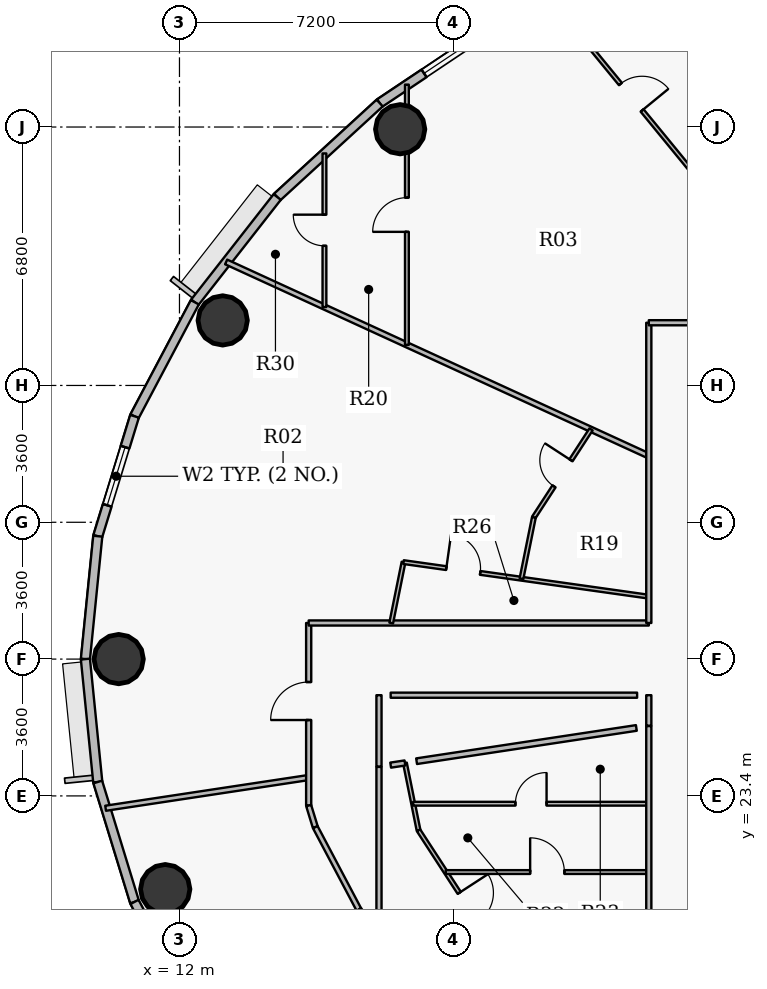
"""IFC4 building model, lengths in metres.
Left out: names, types, materials, properties, quantities, classifications, styles, units other than length and angle.
Written with IfcOpenShell. Run it as: python <this file> out.ifc"""

import sys

from ifc_helpers import new_model, si_unit, direction, frame, frame_2d, origin, origin_2d, place, context, subcontext, project, spatial, rectangle, hollow_circle, extrude, source, transform, mapped, element, fill, save


model = new_model("IFC4")
c1 = context("Model", 3, precision=1e-05, world=origin(), true_north=direction((0.0, 1.0)))
c2 = subcontext(c1, "Body", "Model", "MODEL_VIEW")
j1 = project(units=[si_unit("LENGTHUNIT", "METRE"), si_unit("PLANEANGLEUNIT", "RADIAN")], contexts=[c1])
p1 = place(None, origin())
s1 = spatial("IfcSite", under=j1, at=p1, CompositionType="ELEMENT")
p2 = place(p1, origin())
s2 = spatial("IfcBuilding", under=s1, at=p2, CompositionType="ELEMENT")
p3 = place(p2, frame((0.0, 0.0, 159.9)))
s3 = spatial("IfcBuildingStorey", under=s2, at=p3, CompositionType="ELEMENT", Elevation=159.9)
for number, where, z_axis, x_axis in (
    (1, (17.808, 40.942, 0.0), (0.0, 0.0, 1.0), (1.0, 0.0, 0.0)),
    (2, (13.137, 35.911, 0.0), (0.0, 0.0, 1.0), (1.0, 0.0, 0.0)),
    (3, (10.4, 27.0, 0.0), (0.0, 0.0, 1.0), (1.0, 0.0, 0.0)),
    (4, (11.625, 20.947, 0.0), (0.0, 0.0, 1.0), (1.0, 0.0, 0.0)),
):
    element("IfcColumn", number, at=place(p3, frame(where, z_axis=z_axis, x_axis=x_axis)), inside=s3, PredefinedType="COLUMN", context=c2, shape_type="SweptSolid", body=[
        extrude(hollow_circle(Radius=0.65, WallThickness=0.04, at=origin_2d()), origin(), (0.0, 0.0, 1.0), 3.75),
    ])
p4 = place(p3, frame((17.268, 41.631, 0.0), z_axis=(0.0, 0.0, 1.0), x_axis=(0.831228998277, 0.555930168657, 0.0)))
e5 = element("IfcWall", 5, at=p4, inside=s3, PredefinedType="SOLIDWALL", context=c2, shape_type="SweptSolid", body=[
    extrude(rectangle(XDim=3.8, YDim=0.24, at=frame_2d((1.9, 0.0))), origin(), (0.0, 0.0, 1.0), 3.5),
])
p5 = place(p4, frame((1.405, 0.0, 0.9)))
e6 = element("IfcOpeningElement", 6, at=p5, cuts=e5, PredefinedType="OPENING", context=c2, shape_type="SweptSolid", body=[
    extrude(rectangle(XDim=1.25, YDim=1.65, at=origin_2d()), frame((0.625, 0.13, 0.825), z_axis=(0.0, -1.0, 0.0), x_axis=(1.0, 0.0, 0.0)), (0.0, 0.0, 1.0), 0.26),
])
p6 = place(p3, frame((14.572, 39.158, 0.0), z_axis=(0.0, 0.0, 1.0), x_axis=(0.737076565834, 0.675809245349, 0.0)))
e7 = element("IfcWall", 7, at=p6, inside=s3, PredefinedType="SOLIDWALL", context=c2, shape_type="SweptSolid", body=[
    extrude(rectangle(XDim=3.658, YDim=0.24, at=frame_2d((1.829, 0.0))), origin(), (0.0, 0.0, 1.0), 3.5),
])
p7 = place(p3, frame((12.404, 36.388, 0.0), z_axis=(0.0, 0.0, 1.0), x_axis=(0.616287674549, 0.787521112224, 0.0)))
e8 = element("IfcWall", 8, at=p7, inside=s3, PredefinedType="SOLIDWALL", context=c2, shape_type="SweptSolid", body=[
    extrude(rectangle(XDim=3.517, YDim=0.24, at=frame_2d((1.759, 0.0))), origin(), (0.0, 0.0, 1.0), 3.5),
])
p8 = place(p3, frame((10.817, 33.389, 0.0), z_axis=(0.0, 0.0, 1.0), x_axis=(0.467586874938, 0.88394712194, 0.0)))
e9 = element("IfcWall", 9, at=p8, inside=s3, PredefinedType="SOLIDWALL", context=c2, shape_type="SweptSolid", body=[
    extrude(rectangle(XDim=3.393, YDim=0.24, at=frame_2d((1.697, 0.0))), origin(), (0.0, 0.0, 1.0), 3.5),
])
p9 = place(p3, frame((9.85, 30.234, 0.0), z_axis=(0.0, 0.0, 1.0), x_axis=(0.293097995113, 0.956082405058, 0.0)))
e10 = element("IfcWall", 10, at=p9, inside=s3, PredefinedType="SOLIDWALL", context=c2, shape_type="SweptSolid", body=[
    extrude(rectangle(XDim=3.3, YDim=0.24, at=frame_2d((1.65, 0.0))), origin(), (0.0, 0.0, 1.0), 3.5),
])
p10 = place(p9, frame((0.85, 0.0, 0.9)))
e11 = element("IfcOpeningElement", 11, at=p10, cuts=e10, PredefinedType="OPENING", context=c2, shape_type="SweptSolid", body=[
    extrude(rectangle(XDim=1.6, YDim=1.75, at=origin_2d()), frame((0.8, 0.13, 0.875), z_axis=(0.0, -1.0, 0.0), x_axis=(1.0, 0.0, 0.0)), (0.0, 0.0, 1.0), 0.26),
])
for number, where, z_axis, x_axis in (
    (12, (9.525, 27.0, 0.0), (0.0, 0.0, 1.0), (0.1, 0.995, 0.0)),
    (13, (9.85, 23.766, 0.0), (0.0, 0.0, 1.0), (-0.1, 0.995, 0.0)),
):
    element("IfcWall", number, at=place(p3, frame(where, z_axis=z_axis, x_axis=x_axis)), inside=s3, PredefinedType="SOLIDWALL", context=c2, shape_type="SweptSolid", body=[
        extrude(rectangle(XDim=3.25, YDim=0.24, at=frame_2d((1.625, 0.0))), origin(), (0.0, 0.0, 1.0), 3.5),
    ])
p11 = place(p3, frame((10.817, 20.611, 0.0), z_axis=(0.0, 0.0, 1.0), x_axis=(-0.293097995113, 0.956082405058, 0.0)))
e14 = element("IfcWall", 14, at=p11, inside=s3, PredefinedType="SOLIDWALL", context=c2, shape_type="SweptSolid", body=[
    extrude(rectangle(XDim=3.3, YDim=0.24, at=frame_2d((1.65, 0.0))), origin(), (0.0, 0.0, 1.0), 3.5),
])
p12 = place(p3, frame((12.404, 17.612, 0.0), z_axis=(0.0, 0.0, 1.0), x_axis=(-0.467586874938, 0.88394712194, 0.0)))
e15 = element("IfcWall", 15, at=p12, inside=s3, PredefinedType="SOLIDWALL", context=c2, shape_type="SweptSolid", body=[
    extrude(rectangle(XDim=3.393, YDim=0.24, at=frame_2d((1.697, 0.0))), origin(), (0.0, 0.0, 1.0), 3.5),
])
p13 = place(p12, frame((1.072, 0.0, 0.9)))
e16 = element("IfcOpeningElement", 16, at=p13, cuts=e15, PredefinedType="OPENING", context=c2, shape_type="SweptSolid", body=[
    extrude(rectangle(XDim=1.25, YDim=1.65, at=origin_2d()), frame((0.625, 0.13, 0.825), z_axis=(0.0, -1.0, 0.0), x_axis=(1.0, 0.0, 0.0)), (0.0, 0.0, 1.0), 0.26),
])
p14 = place(p3, frame((10.057, 23.075, 0.0), z_axis=(0.0, 0.0, 1.0), x_axis=(0.988756022356, 0.14953771516, 0.0)))
e17 = element("IfcWall", 17, at=p14, inside=s3, PredefinedType="PARTITIONING", context=c2, shape_type="SweptSolid", body=[
    extrude(rectangle(XDim=5.404, YDim=0.135, at=frame_2d((2.702, 0.0))), origin(), (0.0, 0.0, 1.0), 2.935),
])
p15 = place(p3, frame((13.229, 37.45, 0.0), z_axis=(0.0, 0.0, 1.0), x_axis=(0.908867611309, -0.417084721746, 0.0)))
e18 = element("IfcWall", 18, at=p15, inside=s3, PredefinedType="PARTITIONING", context=c2, shape_type="SweptSolid", body=[
    extrude(rectangle(XDim=12.237, YDim=0.135, at=frame_2d((6.118, 0.0))), origin(), (0.0, 0.0, 1.0), 2.935),
])
p16 = place(p3, frame((15.4, 23.146, 0.0), z_axis=(0.0, 0.0, 1.0), x_axis=(0.0, 1.0, 0.0)))
e19 = element("IfcWall", 19, at=p16, inside=s3, PredefinedType="PARTITIONING", context=c2, shape_type="SweptSolid", body=[
    extrude(rectangle(XDim=4.804, YDim=0.135, at=frame_2d((2.402, 0.0))), origin(), (0.0, 0.0, 1.0), 2.935),
])
p17 = place(p16, frame((2.251, 0.0, 0.0)))
e20 = element("IfcOpeningElement", 20, at=p17, cuts=e19, PredefinedType="OPENING", context=c2, shape_type="SweptSolid", body=[
    extrude(rectangle(XDim=1.0, YDim=2.15, at=origin_2d()), frame((0.5, 0.078, 1.075), z_axis=(0.0, -1.0, 0.0), x_axis=(1.0, 0.0, 0.0)), (0.0, 0.0, 1.0), 0.155),
])
p18 = place(p3, frame((15.4, 23.146, 0.0), z_axis=(0.0, 0.0, 1.0), x_axis=(0.293335154151, -0.956009669061, 0.0)))
e21 = element("IfcWall", 21, at=p18, inside=s3, PredefinedType="PARTITIONING", context=c2, shape_type="SweptSolid", body=[
    extrude(rectangle(XDim=0.594, YDim=0.135, at=frame_2d((0.297, 0.0))), origin(), (0.0, 0.0, 1.0), 3.5),
])
p19 = place(p3, frame((15.4, 27.95, 0.0), z_axis=(0.0, 0.0, 1.0), x_axis=(1.0, 0.0, 0.0)))
e22 = element("IfcWall", 22, at=p19, inside=s3, PredefinedType="PARTITIONING", context=c2, shape_type="SweptSolid", body=[
    extrude(rectangle(XDim=8.95, YDim=0.135, at=frame_2d((4.475, 0.0))), origin(), (0.0, 0.0, 1.0), 3.5),
])
p20 = place(p3, frame((15.574, 22.578, 0.0), z_axis=(0.0, 0.0, 1.0), x_axis=(0.46757196543, -0.883955008552, 0.0)))
e23 = element("IfcWall", 23, at=p20, inside=s3, PredefinedType="PARTITIONING", context=c2, shape_type="SweptSolid", body=[
    extrude(rectangle(XDim=2.451, YDim=0.135, at=frame_2d((1.226, 0.0))), origin(), (0.0, 0.0, 1.0), 2.935),
])
p21 = place(p3, frame((15.815, 36.263, 0.0), z_axis=(0.0, 0.0, 1.0), x_axis=(0.0, 1.0, 0.0)))
e24 = element("IfcWall", 24, at=p21, inside=s3, PredefinedType="PARTITIONING", context=c2, shape_type="SweptSolid", body=[
    extrude(rectangle(XDim=4.042, YDim=0.1, at=frame_2d((2.021, 0.0))), origin(), (0.0, 0.0, 1.0), 2.935),
])
p22 = place(p21, frame((1.611, 0.0, 0.0)))
e25 = element("IfcOpeningElement", 25, at=p22, cuts=e24, PredefinedType="OPENING", context=c2, shape_type="SweptSolid", body=[
    extrude(rectangle(XDim=0.82, YDim=2.1, at=origin_2d()), frame((0.41, 0.06, 1.05), z_axis=(0.0, -1.0, 0.0), x_axis=(1.0, 0.0, 0.0)), (0.0, 0.0, 1.0), 0.12),
])
p23 = place(p3, frame((16.72, 20.411, 0.0), z_axis=(0.0, 0.0, 1.0), x_axis=(0.616377221056, -0.787451027914, 0.0)))
e26 = element("IfcWall", 26, at=p23, inside=s3, PredefinedType="PARTITIONING", context=c2, shape_type="SweptSolid", body=[
    extrude(rectangle(XDim=0.859, YDim=0.135, at=frame_2d((0.43, 0.0))), origin(), (0.0, 0.0, 1.0), 3.5),
])
p24 = place(p3, frame((17.25, 19.734, 0.0), z_axis=(0.0, 0.0, 1.0), x_axis=(0.0, 1.0, 0.0)))
e27 = element("IfcWall", 27, at=p24, inside=s3, PredefinedType="PARTITIONING", context=c2, shape_type="SweptSolid", body=[
    extrude(rectangle(XDim=4.429, YDim=0.135, at=frame_2d((2.215, 0.0))), origin(), (0.0, 0.0, 1.0), 2.935),
])
p25 = place(p3, frame((17.572, 27.95, 0.0), z_axis=(0.0, 0.0, 1.0), x_axis=(0.19821259699, 0.98015905158, 0.0)))
e28 = element("IfcWall", 28, at=p25, inside=s3, PredefinedType="PARTITIONING", context=c2, shape_type="SweptSolid", body=[
    extrude(rectangle(XDim=1.635, YDim=0.1, at=frame_2d((0.817, 0.0))), origin(), (0.0, 0.0, 1.0), 3.5),
])
p26 = place(p3, frame((17.896, 29.552, 0.0), z_axis=(0.0, 0.0, 1.0), x_axis=(0.990212218954, -0.139569915938, 0.0)))
e29 = element("IfcWall", 29, at=p26, inside=s3, PredefinedType="PARTITIONING", context=c2, shape_type="SweptSolid", body=[
    extrude(rectangle(XDim=6.518, YDim=0.1, at=frame_2d((3.259, 0.0))), origin(), (0.0, 0.0, 1.0), 3.5),
])
p27 = place(p26, frame((1.137, 0.0, 0.0)))
e30 = element("IfcOpeningElement", 30, at=p27, cuts=e29, PredefinedType="OPENING", context=c2, shape_type="SweptSolid", body=[
    extrude(rectangle(XDim=0.9, YDim=2.1, at=origin_2d()), frame((0.45, 0.06, 1.05), z_axis=(0.0, -1.0, 0.0), x_axis=(1.0, 0.0, 0.0)), (0.0, 0.0, 1.0), 0.12),
])
p28 = place(p3, frame((17.933, 24.267, 0.0), z_axis=(0.0, 0.0, 1.0), x_axis=(0.198166528342, -0.980168366682, 0.0)))
e31 = element("IfcWall", 31, at=p28, inside=s3, PredefinedType="PARTITIONING", context=c2, shape_type="SweptSolid", body=[
    extrude(rectangle(XDim=1.809, YDim=0.1, at=frame_2d((0.904, 0.0))), origin(), (0.0, 0.0, 1.0), 2.935),
])
p29 = place(p3, frame((17.984, 35.267, 0.0), z_axis=(0.0, 0.0, 1.0), x_axis=(0.0, 1.0, 0.0)))
e32 = element("IfcWall", 32, at=p29, inside=s3, PredefinedType="PARTITIONING", context=c2, shape_type="SweptSolid", body=[
    extrude(rectangle(XDim=6.848, YDim=0.1, at=frame_2d((3.424, 0.0))), origin(), (0.0, 0.0, 1.0), 2.935),
])
p30 = place(p29, frame((2.974, 0.0, 0.0)))
e33 = element("IfcOpeningElement", 33, at=p30, cuts=e32, PredefinedType="OPENING", context=c2, shape_type="SweptSolid", body=[
    extrude(rectangle(XDim=0.9, YDim=2.1, at=origin_2d()), frame((0.45, 0.06, 1.05), z_axis=(0.0, -1.0, 0.0), x_axis=(1.0, 0.0, 0.0)), (0.0, 0.0, 1.0), 0.12),
])
p31 = place(p3, frame((18.15, 23.195, 0.0), z_axis=(0.0, 0.0, 1.0), x_axis=(1.0, 0.0, 0.0)))
e34 = element("IfcWall", 34, at=p31, inside=s3, PredefinedType="PARTITIONING", context=c2, shape_type="SweptSolid", body=[
    extrude(rectangle(XDim=6.2, YDim=0.1, at=frame_2d((3.1, 0.0))), origin(), (0.0, 0.0, 1.0), 2.935),
])
p32 = place(p31, frame((2.69, 0.0, 0.0)))
e35 = element("IfcOpeningElement", 35, at=p32, cuts=e34, PredefinedType="OPENING", context=c2, shape_type="SweptSolid", body=[
    extrude(rectangle(XDim=0.82, YDim=2.1, at=origin_2d()), frame((0.41, 0.06, 1.05), z_axis=(0.0, -1.0, 0.0), x_axis=(1.0, 0.0, 0.0)), (0.0, 0.0, 1.0), 0.12),
])
p33 = place(p3, frame((18.291, 22.494, 0.0), z_axis=(0.0, 0.0, 1.0), x_axis=(0.545405921784, -0.838172047066, 0.0)))
e36 = element("IfcWall", 36, at=p33, inside=s3, PredefinedType="PARTITIONING", context=c2, shape_type="SweptSolid", body=[
    extrude(rectangle(XDim=4.849, YDim=0.1, at=frame_2d((2.425, 0.0))), origin(), (0.0, 0.0, 1.0), 2.935),
])
p34 = place(p33, frame((1.962, 0.0, 0.0)))
e37 = element("IfcOpeningElement", 37, at=p34, cuts=e36, PredefinedType="OPENING", context=c2, shape_type="SweptSolid", body=[
    extrude(rectangle(XDim=0.9, YDim=2.1, at=origin_2d()), frame((0.45, 0.06, 1.05), z_axis=(0.0, -1.0, 0.0), x_axis=(1.0, 0.0, 0.0)), (0.0, 0.0, 1.0), 0.12),
])
p35 = place(p3, frame((19.005, 21.397, 0.0), z_axis=(0.0, 0.0, 1.0), x_axis=(1.0, 0.0, 0.0)))
e38 = element("IfcWall", 38, at=p35, inside=s3, PredefinedType="PARTITIONING", context=c2, shape_type="SweptSolid", body=[
    extrude(rectangle(XDim=5.345, YDim=0.1, at=frame_2d((2.672, 0.0))), origin(), (0.0, 0.0, 1.0), 3.5),
])
p36 = place(p35, frame((2.222, 0.0, 0.0)))
e39 = element("IfcOpeningElement", 39, at=p36, cuts=e38, PredefinedType="OPENING", context=c2, shape_type="SweptSolid", body=[
    extrude(rectangle(XDim=0.9, YDim=2.1, at=origin_2d()), frame((0.45, 0.06, 1.05), z_axis=(0.0, -1.0, 0.0), x_axis=(1.0, 0.0, 0.0)), (0.0, 0.0, 1.0), 0.12),
])
p37 = place(p3, frame((21.0, 29.115, 0.0), z_axis=(0.0, 0.0, 1.0), x_axis=(0.198219197437, 0.980157716782, 0.0)))
e40 = element("IfcWall", 40, at=p37, inside=s3, PredefinedType="PARTITIONING", context=c2, shape_type="SweptSolid", body=[
    extrude(rectangle(XDim=1.652, YDim=0.1, at=frame_2d((0.826, 0.0))), origin(), (0.0, 0.0, 1.0), 3.5),
])
p38 = place(p3, frame((21.327, 30.733, 0.0), z_axis=(0.0, 0.0, 1.0), x_axis=(0.545365017792, 0.838198662233, 0.0)))
e41 = element("IfcWall", 41, at=p38, inside=s3, PredefinedType="PARTITIONING", context=c2, shape_type="SweptSolid", body=[
    extrude(rectangle(XDim=2.756, YDim=0.1, at=frame_2d((1.378, 0.0))), origin(), (0.0, 0.0, 1.0), 2.935),
])
p39 = place(p38, frame((0.968, 0.0, 0.0)))
e42 = element("IfcOpeningElement", 42, at=p39, cuts=e41, PredefinedType="OPENING", context=c2, shape_type="SweptSolid", body=[
    extrude(rectangle(XDim=0.82, YDim=2.1, at=origin_2d()), frame((0.41, 0.06, 1.05), z_axis=(0.0, -1.0, 0.0), x_axis=(1.0, 0.0, 0.0)), (0.0, 0.0, 1.0), 0.12),
])
p40 = place(p3, frame((21.756, 44.387, 0.0), z_axis=(0.0, 0.0, 1.0), x_axis=(0.633727642201, -0.773556252325, 0.0)))
e43 = element("IfcWall", 43, at=p40, inside=s3, PredefinedType="PARTITIONING", context=c2, shape_type="SweptSolid", body=[
    extrude(rectangle(XDim=6.729, YDim=0.1, at=frame_2d((3.365, 0.0))), origin(), (0.0, 0.0, 1.0), 2.935),
])
p41 = place(p40, frame((2.915, 0.0, 0.0)))
e44 = element("IfcOpeningElement", 44, at=p41, cuts=e43, PredefinedType="OPENING", context=c2, shape_type="SweptSolid", body=[
    extrude(rectangle(XDim=0.9, YDim=2.1, at=origin_2d()), frame((0.45, 0.06, 1.05), z_axis=(0.0, -1.0, 0.0), x_axis=(1.0, 0.0, 0.0)), (0.0, 0.0, 1.0), 0.12),
])
p42 = place(p3, frame((24.35, 18.15, 0.0), z_axis=(0.0, 0.0, 1.0), x_axis=(0.0, 1.0, 0.0)))
e45 = element("IfcWall", 45, at=p42, inside=s3, PredefinedType="PARTITIONING", context=c2, shape_type="SweptSolid", body=[
    extrude(rectangle(XDim=7.088, YDim=0.135, at=frame_2d((3.544, 0.0))), origin(), (0.0, 0.0, 1.0), 2.935),
])
p43 = place(p3, frame((24.35, 27.95, 0.0), z_axis=(0.0, 0.0, 1.0), x_axis=(0.0, 1.0, 0.0)))
e46 = element("IfcWall", 46, at=p43, inside=s3, PredefinedType="PARTITIONING", context=c2, shape_type="SweptSolid", body=[
    extrude(rectangle(XDim=7.9, YDim=0.135, at=frame_2d((3.95, 0.0))), origin(), (0.0, 0.0, 1.0), 2.935),
])
p44 = place(p3, frame((24.35, 35.85, 0.0), z_axis=(0.0, 0.0, 1.0), x_axis=(1.0, 0.0, 0.0)))
e47 = element("IfcWall", 47, at=p44, inside=s3, PredefinedType="PARTITIONING", context=c2, shape_type="SweptSolid", body=[
    extrude(rectangle(XDim=29.104, YDim=0.135, at=frame_2d((14.552, 0.0))), origin(), (0.0, 0.0, 1.0), 2.935),
])
p45 = place(p44, frame((15.972, 0.0, 0.0)))
e48 = element("IfcOpeningElement", 48, at=p45, cuts=e47, PredefinedType="OPENING", context=c2, shape_type="SweptSolid", body=[
    extrude(rectangle(XDim=1.0, YDim=2.15, at=origin_2d()), frame((0.5, 0.078, 1.075), z_axis=(0.0, -1.0, 0.0), x_axis=(1.0, 0.0, 0.0)), (0.0, 0.0, 1.0), 0.155),
])
p46 = place(p44, frame((4.074, 0.0, 0.0)))
e49 = element("IfcOpeningElement", 49, at=p46, cuts=e47, PredefinedType="OPENING", context=c2, shape_type="SweptSolid", body=[
    extrude(rectangle(XDim=1.0, YDim=2.15, at=origin_2d()), frame((0.5, 0.078, 1.075), z_axis=(0.0, -1.0, 0.0), x_axis=(1.0, 0.0, 0.0)), (0.0, 0.0, 1.0), 0.155),
])
p47 = place(p3, frame((17.25, 26.05, 0.0), z_axis=(0.0, 0.0, 1.0), x_axis=(0.0, -1.0, 0.0)))
e50 = element("IfcWall", 50, at=p47, inside=s3, PredefinedType="PARTITIONING", context=c2, shape_type="SweptSolid", body=[
    extrude(rectangle(XDim=1.876, YDim=0.135, at=frame_2d((0.938, 0.0))), origin(), (0.0, 0.0, 1.0), 3.035),
])
p48 = place(p3, frame((24.35, 25.248, 0.0), z_axis=(0.0, 0.0, 1.0), x_axis=(0.0, 1.0, 0.0)))
e51 = element("IfcWall", 51, at=p48, inside=s3, PredefinedType="PARTITIONING", context=c2, shape_type="SweptSolid", body=[
    extrude(rectangle(XDim=0.802, YDim=0.135, at=frame_2d((0.401, 0.0))), origin(), (0.0, 0.0, 1.0), 3.5),
])
p49 = place(p3, frame((24.042, 26.05, 0.0), z_axis=(0.0, 0.0, 1.0), x_axis=(-1.0, 0.0, 0.0)))
e52 = element("IfcWall", 52, at=p49, inside=s3, PredefinedType="PARTITIONING", context=c2, shape_type="SweptSolid", body=[
    extrude(rectangle(XDim=6.485, YDim=0.135, at=frame_2d((3.242, 0.0))), origin(), (0.0, 0.0, 1.0), 3.5),
])
p50 = place(p3, frame((17.558, 24.21, 0.0), z_axis=(0.0, 0.0, 1.0), x_axis=(0.988703952477, 0.149881601124, 0.0)))
e53 = element("IfcWall", 53, at=p50, inside=s3, PredefinedType="PARTITIONING", context=c2, shape_type="SweptSolid", body=[
    extrude(rectangle(XDim=0.38, YDim=0.135, at=frame_2d((0.19, 0.0))), origin(), (0.0, 0.0, 1.0), 3.035),
])
p51 = place(p3, frame((18.24, 24.313, 0.0), z_axis=(0.0, 0.0, 1.0), x_axis=(0.988751262043, 0.149569187364, 0.0)))
e54 = element("IfcWall", 54, at=p51, inside=s3, PredefinedType="PARTITIONING", context=c2, shape_type="SweptSolid", body=[
    extrude(rectangle(XDim=5.848, YDim=0.15, at=frame_2d((2.924, 0.0))), origin(), (0.0, 0.0, 1.0), 3.5),
])
m1 = source(origin(), c2, "Body", "SweptSolid", [
    extrude(rectangle(XDim=1.6, YDim=1.75, at=origin_2d()), frame((0.8, 0.03, 0.875), z_axis=(0.0, -1.0, 0.0), x_axis=(1.0, 0.0, 0.0)), (0.0, 0.0, 1.0), 0.06),
])
p52 = place(p10, origin())
e55 = element("IfcWindow", 55, at=p52, inside=s3, PartitioningType="DOUBLE_PANEL_VERTICAL", PredefinedType="WINDOW", context=c2, shape_type="MappedRepresentation", body=[
    mapped(m1, transform((0.0, 0.0, 0.0), x_axis=(1.0, 0.0, 0.0), y_axis=(0.0, 1.0, 0.0), z_axis=(0.0, 0.0, 1.0), scale=1.0)),
])
fill(e11, e55)
m2 = source(origin(), c2, "Body", "SweptSolid", [
    extrude(rectangle(XDim=1.25, YDim=1.65, at=origin_2d()), frame((0.625, 0.03, 0.825), z_axis=(0.0, -1.0, 0.0), x_axis=(1.0, 0.0, 0.0)), (0.0, 0.0, 1.0), 0.06),
])
p53 = place(p5, origin())
e56 = element("IfcWindow", 56, at=p53, inside=s3, PartitioningType="SINGLE_PANEL", PredefinedType="WINDOW", context=c2, shape_type="MappedRepresentation", body=[
    mapped(m2, transform((0.0, 0.0, 0.0), x_axis=(1.0, 0.0, 0.0), y_axis=(0.0, 1.0, 0.0), z_axis=(0.0, 0.0, 1.0), scale=1.0)),
])
fill(e6, e56)
m3 = source(origin(), c2, "Body", "SweptSolid", [
    extrude(rectangle(XDim=0.9, YDim=2.1, at=origin_2d()), frame((0.45, 0.025, 1.05), z_axis=(0.0, -1.0, 0.0), x_axis=(1.0, 0.0, 0.0)), (0.0, 0.0, 1.0), 0.05),
])
p54 = place(p41, origin())
e57 = element("IfcDoor", 57, at=p54, inside=s3, OperationType="SINGLE_SWING_RIGHT", PredefinedType="DOOR", context=c2, shape_type="MappedRepresentation", body=[
    mapped(m3, transform((0.0, 0.0, 0.0), x_axis=(1.0, 0.0, 0.0), y_axis=(0.0, 1.0, 0.0), z_axis=(0.0, 0.0, 1.0), scale=1.0)),
])
fill(e44, e57)
p55 = place(p30, origin())
e58 = element("IfcDoor", 58, at=p55, inside=s3, OperationType="SINGLE_SWING_LEFT", PredefinedType="DOOR", context=c2, shape_type="MappedRepresentation", body=[
    mapped(m3, transform((0.0, 0.0, 0.0), x_axis=(1.0, 0.0, 0.0), y_axis=(0.0, 1.0, 0.0), z_axis=(0.0, 0.0, 1.0), scale=1.0)),
])
fill(e33, e58)
m4 = source(origin(), c2, "Body", "SweptSolid", [
    extrude(rectangle(XDim=0.82, YDim=2.1, at=origin_2d()), frame((0.41, 0.025, 1.05), z_axis=(0.0, -1.0, 0.0), x_axis=(1.0, 0.0, 0.0)), (0.0, 0.0, 1.0), 0.05),
])
p56 = place(p22, origin())
e59 = element("IfcDoor", 59, at=p56, inside=s3, OperationType="SINGLE_SWING_RIGHT", PredefinedType="DOOR", context=c2, shape_type="MappedRepresentation", body=[
    mapped(m4, transform((0.0, 0.0, 0.0), x_axis=(1.0, 0.0, 0.0), y_axis=(0.0, 1.0, 0.0), z_axis=(0.0, 0.0, 1.0), scale=1.0)),
])
fill(e25, e59)
m5 = source(origin(), c2, "Body", "SweptSolid", [
    extrude(rectangle(XDim=1.0, YDim=2.15, at=origin_2d()), frame((0.5, 0.025, 1.075), z_axis=(0.0, -1.0, 0.0), x_axis=(1.0, 0.0, 0.0)), (0.0, 0.0, 1.0), 0.05),
])
p57 = place(p17, origin())
e60 = element("IfcDoor", 60, at=p57, inside=s3, OperationType="SINGLE_SWING_LEFT", PredefinedType="DOOR", context=c2, shape_type="MappedRepresentation", body=[
    mapped(m5, transform((0.0, 0.0, 0.0), x_axis=(1.0, 0.0, 0.0), y_axis=(0.0, 1.0, 0.0), z_axis=(0.0, 0.0, 1.0), scale=1.0)),
])
fill(e20, e60)
p58 = place(p39, origin())
e61 = element("IfcDoor", 61, at=p58, inside=s3, OperationType="SINGLE_SWING_RIGHT", PredefinedType="DOOR", context=c2, shape_type="MappedRepresentation", body=[
    mapped(m4, transform((0.0, 0.0, 0.0), x_axis=(1.0, 0.0, 0.0), y_axis=(0.0, 1.0, 0.0), z_axis=(0.0, 0.0, 1.0), scale=1.0)),
])
fill(e42, e61)
p59 = place(p27, origin())
e62 = element("IfcDoor", 62, at=p59, inside=s3, OperationType="SINGLE_SWING_LEFT", PredefinedType="DOOR", context=c2, shape_type="MappedRepresentation", body=[
    mapped(m3, transform((0.0, 0.0, 0.0), x_axis=(1.0, 0.0, 0.0), y_axis=(0.0, 1.0, 0.0), z_axis=(0.0, 0.0, 1.0), scale=1.0)),
])
fill(e30, e62)
p60 = place(p34, origin())
e63 = element("IfcDoor", 63, at=p60, inside=s3, OperationType="SINGLE_SWING_LEFT", PredefinedType="DOOR", context=c2, shape_type="MappedRepresentation", body=[
    mapped(m3, transform((0.0, 0.0, 0.0), x_axis=(1.0, 0.0, 0.0), y_axis=(0.0, 1.0, 0.0), z_axis=(0.0, 0.0, 1.0), scale=1.0)),
])
fill(e37, e63)
p61 = place(p36, origin())
e64 = element("IfcDoor", 64, at=p61, inside=s3, OperationType="SINGLE_SWING_LEFT", PredefinedType="DOOR", context=c2, shape_type="MappedRepresentation", body=[
    mapped(m3, transform((0.0, 0.0, 0.0), x_axis=(1.0, 0.0, 0.0), y_axis=(0.0, 1.0, 0.0), z_axis=(0.0, 0.0, 1.0), scale=1.0)),
])
fill(e39, e64)
p62 = place(p32, origin())
e65 = element("IfcDoor", 65, at=p62, inside=s3, OperationType="SINGLE_SWING_RIGHT", PredefinedType="DOOR", context=c2, shape_type="MappedRepresentation", body=[
    mapped(m4, transform((0.0, 0.0, 0.0), x_axis=(1.0, 0.0, 0.0), y_axis=(0.0, 1.0, 0.0), z_axis=(0.0, 0.0, 1.0), scale=1.0)),
])
fill(e35, e65)
save(model, sys.argv[1])
